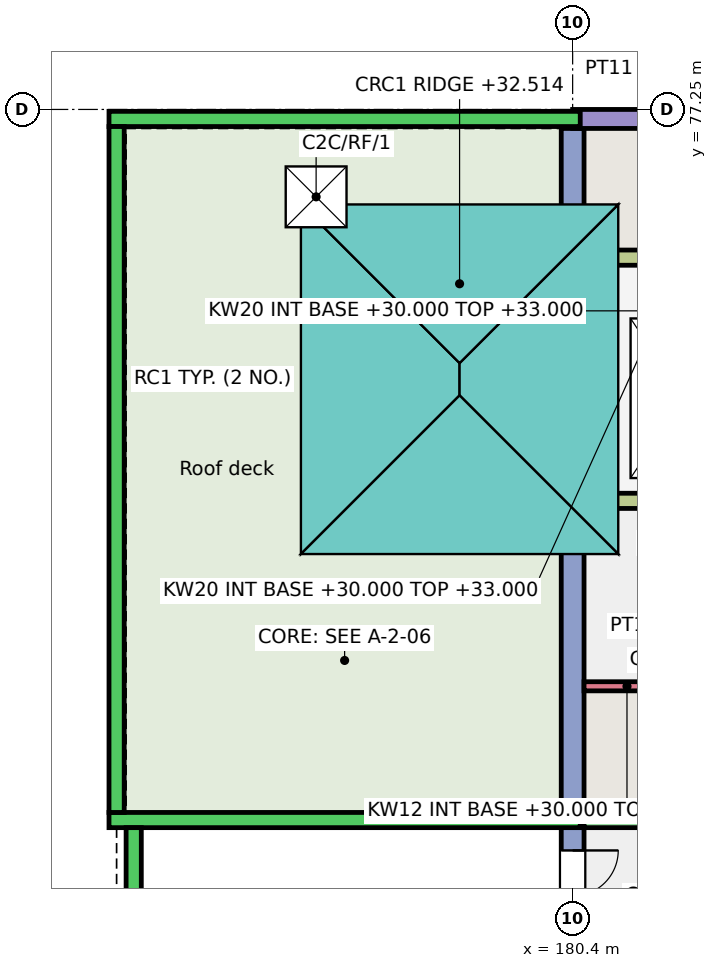
"""IFC4 building model, lengths in metres.
Left out: names, types, materials, properties, quantities, classifications, styles, units other than length and angle.
Written with IfcOpenShell. Run it as: python <this file> out.ifc"""

import sys

from ifc_helpers import new_model, si_unit, direction, frame, frame_2d, origin, origin_2d, place, context, subcontext, project, spatial, rectangle, extrude, element, fill, save


model = new_model("IFC4")
c1 = context("Model", 3, precision=1e-05, world=origin(), true_north=direction((0.0, 1.0)))
c2 = subcontext(c1, "Body", "Model", "MODEL_VIEW")
j1 = project(units=[si_unit("LENGTHUNIT", "METRE"), si_unit("PLANEANGLEUNIT", "RADIAN")], contexts=[c1])
p1 = place(None, origin())
s1 = spatial("IfcSite", under=j1, at=p1, CompositionType="ELEMENT")
p2 = place(p1, origin())
s2 = spatial("IfcBuilding", under=s1, at=p2, CompositionType="ELEMENT")
p3 = place(p2, frame((0.0, 0.0, 30.0)))
s3 = spatial("IfcBuildingStorey", under=s2, at=p3, CompositionType="ELEMENT", Elevation=30.0)
p4 = place(p3, frame((180.4, 66.0, 0.0), z_axis=(0.0, 0.0, 1.0), x_axis=(0.0, 1.0, 0.0)))
e1 = element("IfcWall", 1, at=p4, inside=s3, PredefinedType="SHEAR", context=c2, shape_type="SweptSolid", body=[
    extrude(rectangle(XDim=11.0, YDim=0.3, at=frame_2d((5.5, 0.0))), origin(), (0.0, 0.0, 1.0), 3.0),
])
p5 = place(p4, frame((0.3, 0.0, 0.0)))
e2 = element("IfcOpeningElement", 2, at=p5, cuts=e1, PredefinedType="OPENING", context=c2, shape_type="SweptSolid", body=[
    extrude(rectangle(XDim=1.2, YDim=2.1, at=frame_2d((0.6, 1.05))), frame((0.0, 0.16, 0.0), z_axis=(0.0, -1.0, 0.0), x_axis=(1.0, 0.0, 0.0)), (0.0, 0.0, 1.0), 0.32),
])
p6 = place(p3, frame((180.4, 77.125, 0.0), z_axis=(0.0, 0.0, 1.0), x_axis=(1.0, 0.0, 0.0)))
e3 = element("IfcWall", 3, at=p6, inside=s3, PredefinedType="SOLIDWALL", context=c2, shape_type="SweptSolid", body=[
    extrude(rectangle(XDim=2.975, YDim=0.25, at=frame_2d((1.488, 0.0))), origin(), (0.0, 0.0, 1.0), 3.0),
])
p7 = place(p3, frame((180.55, 67.9, 0.0), z_axis=(0.0, 0.0, 1.0), x_axis=(1.0, 0.0, 0.0)))
e4 = element("IfcWall", 4, at=p7, inside=s3, PredefinedType="SHEAR", context=c2, shape_type="SweptSolid", body=[
    extrude(rectangle(XDim=5.85, YDim=0.2, at=frame_2d((2.925, 0.0))), origin(), (0.0, 0.0, 1.0), 3.0),
])
p8 = place(p7, frame((2.312, 0.0, 0.0)))
e5 = element("IfcOpeningElement", 5, at=p8, cuts=e4, PredefinedType="OPENING", context=c2, shape_type="SweptSolid", body=[
    extrude(rectangle(XDim=1.1, YDim=2.1, at=frame_2d((0.55, 1.05))), frame((0.0, 0.11, 0.0), z_axis=(0.0, -1.0, 0.0), x_axis=(1.0, 0.0, 0.0)), (0.0, 0.0, 1.0), 0.22),
])
p9 = place(p3, frame((180.55, 72.1, 0.0), z_axis=(0.0, 0.0, 1.0), x_axis=(1.0, 0.0, 0.0)))
e6 = element("IfcWall", 6, at=p9, inside=s3, PredefinedType="SHEAR", context=c2, shape_type="SweptSolid", body=[
    extrude(rectangle(XDim=5.725, YDim=0.2, at=frame_2d((2.862, 0.0))), origin(), (0.0, 0.0, 1.0), 3.0),
])
p10 = place(p9, frame((3.775, 0.0, 0.0)))
e7 = element("IfcOpeningElement", 7, at=p10, cuts=e6, PredefinedType="OPENING", context=c2, shape_type="SweptSolid", body=[
    extrude(rectangle(XDim=1.0, YDim=2.1, at=frame_2d((0.5, 1.05))), frame((0.0, 0.11, 0.0), z_axis=(0.0, -1.0, 0.0), x_axis=(1.0, 0.0, 0.0)), (0.0, 0.0, 1.0), 0.22),
])
p11 = place(p9, frame((0.762, 0.0, 0.0)))
e8 = element("IfcOpeningElement", 8, at=p11, cuts=e6, PredefinedType="OPENING", context=c2, shape_type="SweptSolid", body=[
    extrude(rectangle(XDim=1.1, YDim=2.1, at=frame_2d((0.55, 1.05))), frame((0.0, 0.11, 0.0), z_axis=(0.0, -1.0, 0.0), x_axis=(1.0, 0.0, 0.0)), (0.0, 0.0, 1.0), 0.22),
])
p12 = place(p3, frame((180.55, 75.3, 0.0), z_axis=(0.0, 0.0, 1.0), x_axis=(1.0, 0.0, 0.0)))
e9 = element("IfcWall", 9, at=p12, inside=s3, PredefinedType="SHEAR", context=c2, shape_type="SweptSolid", body=[
    extrude(rectangle(XDim=2.625, YDim=0.2, at=frame_2d((1.312, 0.0))), origin(), (0.0, 0.0, 1.0), 3.0),
])
p13 = place(p3, frame((180.55, 69.66, 0.0), z_axis=(0.0, 0.0, 1.0), x_axis=(1.0, 0.0, 0.0)))
e10 = element("IfcWall", 10, at=p13, inside=s3, PredefinedType="SHEAR", context=c2, shape_type="SweptSolid", body=[
    extrude(rectangle(XDim=1.13, YDim=0.12, at=frame_2d((0.565, 0.0))), origin(), (0.0, 0.0, 1.0), 3.0),
])
for number, where, z_axis, x_axis in (
    (11, (177.425, 72.1, 0.0), (0.0, 0.0, 1.0), (1.0, 0.0, 0.0)),
    (12, (177.425, 75.3, 0.0), (0.0, 0.0, 1.0), (1.0, 0.0, 0.0)),
):
    element("IfcWall", number, at=place(p3, frame(where, z_axis=z_axis, x_axis=x_axis)), inside=s3, PredefinedType="SHEAR", context=c2, shape_type="SweptSolid", body=[
        extrude(rectangle(XDim=2.825, YDim=0.2, at=frame_2d((1.413, 0.0))), origin(), (0.0, 0.0, 1.0), 1.5),
    ])
p14 = place(p3, frame((177.525, 72.2, 0.0), z_axis=(0.0, 0.0, 1.0), x_axis=(0.0, 1.0, 0.0)))
e13 = element("IfcWall", 13, at=p14, inside=s3, PredefinedType="SHEAR", context=c2, shape_type="SweptSolid", body=[
    extrude(rectangle(XDim=3.0, YDim=0.2, at=frame_2d((1.5, 0.0))), origin(), (0.0, 0.0, 1.0), 1.5),
])
for number, where, z_axis, x_axis in (
    (14, (174.3, 77.125, 0.0), (0.0, 0.0, 1.0), (1.0, 0.0, 0.0)),
    (15, (174.3, 67.9, 0.0), (0.0, 0.0, 1.0), (1.0, 0.0, 0.0)),
):
    element("IfcWall", number, at=place(p3, frame(where, z_axis=z_axis, x_axis=x_axis)), inside=s3, PredefinedType="PARAPET", context=c2, shape_type="SweptSolid", body=[
        extrude(rectangle(XDim=6.2, YDim=0.2, at=frame_2d((3.1, 0.0))), origin(), (0.0, 0.0, 1.0), 1.1),
    ])
p15 = place(p3, frame((174.4, 68.0, 0.0), z_axis=(0.0, 0.0, 1.0), x_axis=(0.0, 1.0, 0.0)))
e16 = element("IfcWall", 16, at=p15, inside=s3, PredefinedType="PARAPET", context=c2, shape_type="SweptSolid", body=[
    extrude(rectangle(XDim=9.025, YDim=0.2, at=frame_2d((4.512, 0.0))), origin(), (0.0, 0.0, 1.0), 1.1),
])
p16 = place(p3, frame((174.625, 66.225, 0.0), z_axis=(0.0, 0.0, 1.0), x_axis=(0.0, 1.0, 0.0)))
e17 = element("IfcWall", 17, at=p16, inside=s3, PredefinedType="PARAPET", context=c2, shape_type="SweptSolid", body=[
    extrude(rectangle(XDim=1.575, YDim=0.2, at=frame_2d((0.788, 0.0))), origin(), (0.0, 0.0, 1.0), 1.1),
])
p17 = place(p3, frame((0.0, 0.0, -0.25)))
p18 = place(p17, frame((177.025, 76.1, 0.0)))
p19 = place(p18, frame((0.0, 0.0, 0.2)))
e18 = element("IfcDoor", 18, at=p19, inside=s3, OperationType="SINGLE_SWING_LEFT", PredefinedType="TRAPDOOR", context=c2, shape_type="SweptSolid", body=[
    extrude(rectangle(XDim=0.8, YDim=0.8, at=origin_2d()), origin(), (0.0, 0.0, 1.0), 0.05),
])
p20 = place(p5, origin())
e19 = element("IfcDoor", 19, at=p20, inside=s3, OperationType="DOUBLE_DOOR_SINGLE_SWING", PredefinedType="DOOR", context=c2, shape_type="SweptSolid", body=[
    extrude(rectangle(XDim=1.2, YDim=2.1, at=frame_2d((0.6, 1.05))), frame((0.0, 0.025, 0.0), z_axis=(0.0, -1.0, 0.0), x_axis=(1.0, 0.0, 0.0)), (0.0, 0.0, 1.0), 0.05),
])
fill(e2, e19)
save(model, sys.argv[1])
